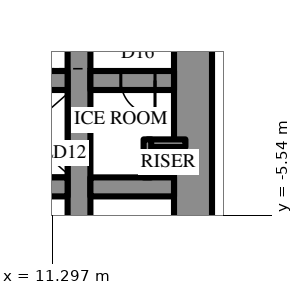
"""IFC4 building model, lengths in metres.
Left out: names, types, materials, properties, quantities, classifications, styles, units other than length and angle.
Written with IfcOpenShell. Run it as: python <this file> out.ifc"""

import sys

from ifc_helpers import new_model, si_unit, direction, frame, frame_2d, origin, place, context, subcontext, project, spatial, rectangle, extrude, element, fill, save


model = new_model("IFC4")
c1 = context("Model", 3, precision=1e-05, world=origin(), true_north=direction((0.0, 1.0)))
c2 = subcontext(c1, "Body", "Model", "MODEL_VIEW")
j1 = project(units=[si_unit("LENGTHUNIT", "METRE"), si_unit("PLANEANGLEUNIT", "RADIAN")], contexts=[c1])
p1 = place(None, origin())
s1 = spatial("IfcSite", under=j1, at=p1, CompositionType="ELEMENT")
p2 = place(p1, origin())
s2 = spatial("IfcBuilding", under=s1, at=p2, CompositionType="ELEMENT")
p3 = place(p2, frame((0.0, 0.0, 306.5)))
s3 = spatial("IfcBuildingStorey", under=s2, at=p3, CompositionType="ELEMENT", Elevation=306.5)
p4 = place(p3, frame((15.0, -10.7, 0.0), z_axis=(0.0, 0.0, 1.0), x_axis=(0.0, 1.0, 0.0)))
e1 = element("IfcWall", 1, at=p4, inside=s3, PredefinedType="SHEAR", context=c2, shape_type="SweptSolid", body=[
    extrude(rectangle(XDim=21.4, YDim=1.0, at=frame_2d((10.7, 0.0))), origin(), (0.0, 0.0, 1.0), 5.0),
])
p5 = place(p4, frame((9.8, 0.0, 0.0)))
e2 = element("IfcOpeningElement", 2, at=p5, cuts=e1, PredefinedType="OPENING", context=c2, shape_type="SweptSolid", body=[
    extrude(rectangle(XDim=1.8, YDim=2.4, at=frame_2d((0.9, 1.2))), frame((0.0, 0.51, 0.0), z_axis=(0.0, -1.0, 0.0), x_axis=(1.0, 0.0, 0.0)), (0.0, 0.0, 1.0), 1.02),
])
p6 = place(p3, frame((12.0, -10.7, 0.0), z_axis=(0.0, 0.0, 1.0), x_axis=(0.0, 1.0, 0.0)))
e3 = element("IfcWall", 3, at=p6, inside=s3, PredefinedType="SHEAR", context=c2, shape_type="SweptSolid", body=[
    extrude(rectangle(XDim=21.4, YDim=0.6, at=frame_2d((10.7, 0.0))), origin(), (0.0, 0.0, 1.0), 5.0),
])
p7 = place(p6, frame((9.8, 0.0, 0.0)))
e4 = element("IfcOpeningElement", 4, at=p7, cuts=e3, PredefinedType="OPENING", context=c2, shape_type="SweptSolid", body=[
    extrude(rectangle(XDim=1.8, YDim=2.4, at=frame_2d((0.9, 1.2))), frame((0.0, 0.31, 0.0), z_axis=(0.0, -1.0, 0.0), x_axis=(1.0, 0.0, 0.0)), (0.0, 0.0, 1.0), 0.62),
])
p8 = place(p3, frame((14.5, -2.0, 0.0), z_axis=(0.0, 0.0, 1.0), x_axis=(-1.0, 0.0, 0.0)))
e5 = element("IfcWall", 5, at=p8, inside=s3, PredefinedType="SHEAR", context=c2, shape_type="SweptSolid", body=[
    extrude(rectangle(XDim=2.2, YDim=0.5, at=frame_2d((1.1, 0.0))), origin(), (0.0, 0.0, 1.0), 5.0),
])
p9 = place(p8, frame((0.5, 0.0, 0.0)))
e6 = element("IfcOpeningElement", 6, at=p9, cuts=e5, PredefinedType="OPENING", context=c2, shape_type="SweptSolid", body=[
    extrude(rectangle(XDim=0.9, YDim=2.2, at=frame_2d((0.45, 1.1))), frame((0.0, 0.26, 0.0), z_axis=(0.0, -1.0, 0.0), x_axis=(1.0, 0.0, 0.0)), (0.0, 0.0, 1.0), 0.52),
])
p10 = place(p3, frame((11.7, -2.0, 0.0), z_axis=(0.0, 0.0, 1.0), x_axis=(-1.0, 0.0, 0.0)))
e7 = element("IfcWall", 7, at=p10, inside=s3, PredefinedType="SHEAR", context=c2, shape_type="SweptSolid", body=[
    extrude(rectangle(XDim=5.9, YDim=0.5, at=frame_2d((2.95, 0.0))), origin(), (0.0, 0.0, 1.0), 5.0),
])
p11 = place(p10, frame((0.6, 0.0, 0.0)))
e8 = element("IfcOpeningElement", 8, at=p11, cuts=e7, PredefinedType="OPENING", context=c2, shape_type="SweptSolid", body=[
    extrude(rectangle(XDim=1.2, YDim=2.2, at=frame_2d((0.6, 1.1))), frame((0.0, 0.26, 0.0), z_axis=(0.0, -1.0, 0.0), x_axis=(1.0, 0.0, 0.0)), (0.0, 0.0, 1.0), 0.52),
])
p12 = place(p3, frame((14.5, -4.8, 0.0), z_axis=(0.0, 0.0, 1.0), x_axis=(-1.0, 0.0, 0.0)))
e9 = element("IfcWall", 9, at=p12, inside=s3, PredefinedType="SHEAR", context=c2, shape_type="SweptSolid", body=[
    extrude(rectangle(XDim=2.2, YDim=0.5, at=frame_2d((1.1, 0.0))), origin(), (0.0, 0.0, 1.0), 5.0),
])
p13 = place(p3, frame((11.7, -4.8, 0.0), z_axis=(0.0, 0.0, 1.0), x_axis=(-1.0, 0.0, 0.0)))
e10 = element("IfcWall", 10, at=p13, inside=s3, PredefinedType="SHEAR", context=c2, shape_type="SweptSolid", body=[
    extrude(rectangle(XDim=23.4, YDim=0.5, at=frame_2d((11.7, 0.0))), origin(), (0.0, 0.0, 1.0), 5.0),
])
p14 = place(p13, frame((6.6, 0.0, 0.0)))
e11 = element("IfcOpeningElement", 11, at=p14, cuts=e10, PredefinedType="OPENING", context=c2, shape_type="SweptSolid", body=[
    extrude(rectangle(XDim=1.2, YDim=2.2, at=frame_2d((0.6, 1.1))), frame((0.0, 0.26, 0.0), z_axis=(0.0, -1.0, 0.0), x_axis=(1.0, 0.0, 0.0)), (0.0, 0.0, 1.0), 0.52),
])
p15 = place(p13, frame((3.6, 0.0, 0.0)))
e12 = element("IfcOpeningElement", 12, at=p15, cuts=e10, PredefinedType="OPENING", context=c2, shape_type="SweptSolid", body=[
    extrude(rectangle(XDim=1.2, YDim=2.2, at=frame_2d((0.6, 1.1))), frame((0.0, 0.26, 0.0), z_axis=(0.0, -1.0, 0.0), x_axis=(1.0, 0.0, 0.0)), (0.0, 0.0, 1.0), 0.52),
])
for number, where, z_axis, x_axis in (
    (13, (14.8, -3.65, 0.0), (0.0, 0.0, 1.0), (-1.0, 0.0, 0.0)),
    (14, (13.8, -3.55, 0.0), (0.0, 0.0, 1.0), (0.0, -1.0, 0.0)),
):
    element("IfcWall", number, at=place(p3, frame(where, z_axis=z_axis, x_axis=x_axis)), inside=s3, PredefinedType="PARTITIONING", context=c2, shape_type="SweptSolid", body=[
        extrude(rectangle(XDim=1.0, YDim=0.2, at=frame_2d((0.5, 0.0))), origin(), (0.0, 0.0, 1.0), 4.8),
    ])
p16 = place(p9, origin())
e15 = element("IfcDoor", 15, at=p16, inside=s3, OperationType="SINGLE_SWING_RIGHT", PredefinedType="DOOR", context=c2, shape_type="SweptSolid", body=[
    extrude(rectangle(XDim=0.9, YDim=2.2, at=frame_2d((0.45, 1.1))), frame((0.0, 0.025, 0.0), z_axis=(0.0, -1.0, 0.0), x_axis=(1.0, 0.0, 0.0)), (0.0, 0.0, 1.0), 0.05),
])
fill(e6, e15)
save(model, sys.argv[1])
